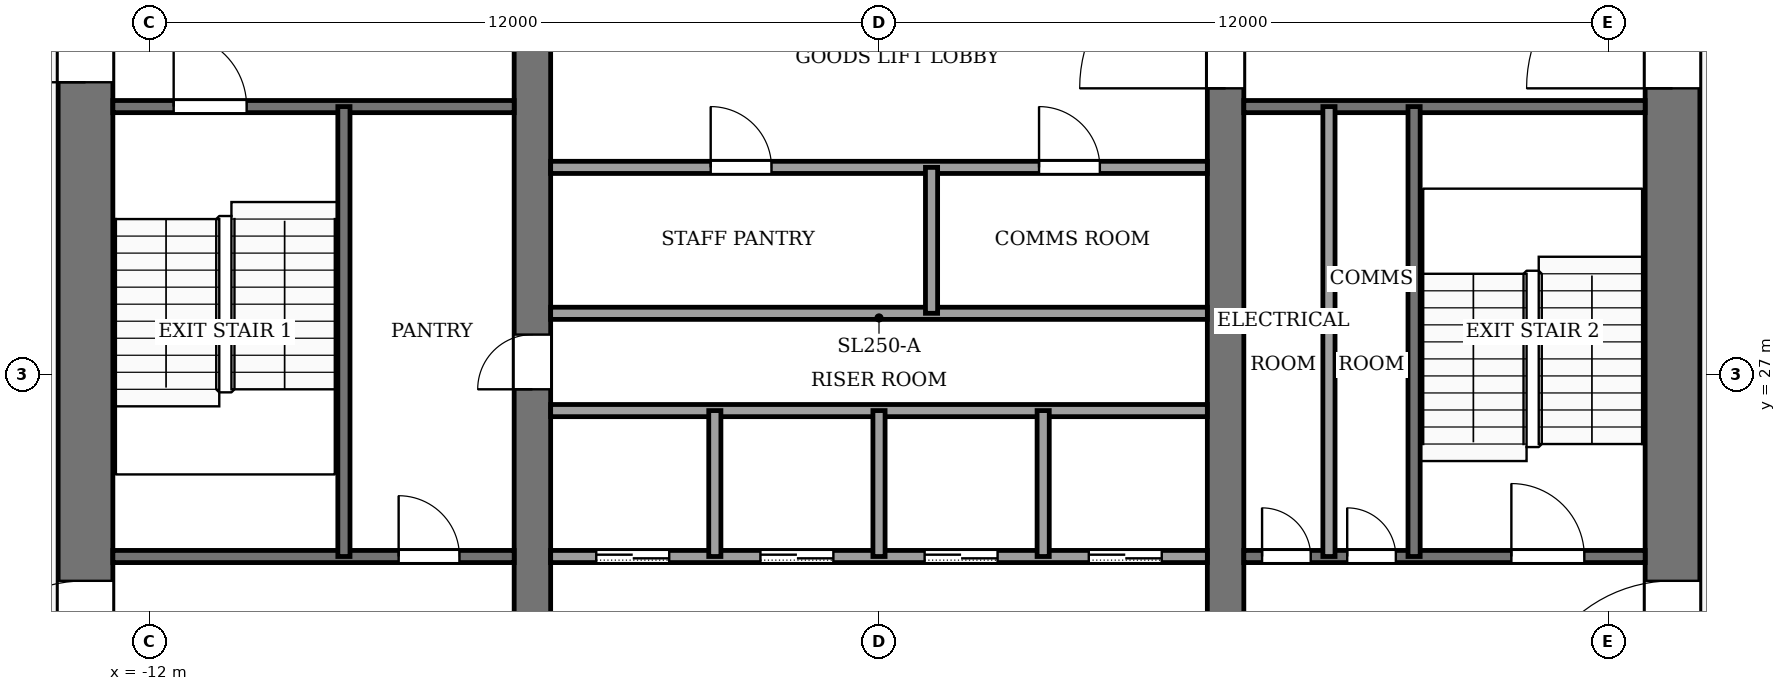
"""IFC4 building model, lengths in metres.
Left out: names, types, materials, properties, quantities, classifications, styles, units other than length and angle.
Written with IfcOpenShell. Run it as: python <this file> out.ifc"""

import sys

from ifc_helpers import new_model, si_unit, direction, frame, frame_2d, origin, place, context, subcontext, project, spatial, rectangle, extrude, element, fill, save


model = new_model("IFC4")
c1 = context("Model", 3, precision=1e-05, world=origin(), true_north=direction((0.0, 1.0)))
c2 = subcontext(c1, "Body", "Model", "MODEL_VIEW")
j1 = project(units=[si_unit("LENGTHUNIT", "METRE"), si_unit("PLANEANGLEUNIT", "RADIAN")], contexts=[c1])
p1 = place(None, origin())
s1 = spatial("IfcSite", under=j1, at=p1, CompositionType="ELEMENT")
p2 = place(p1, origin())
s2 = spatial("IfcBuilding", under=s1, at=p2, CompositionType="ELEMENT")
p3 = place(p2, frame((0.0, 0.0, 194.0)))
s3 = spatial("IfcBuildingStorey", under=s2, at=p3, CompositionType="ELEMENT", Elevation=194.0)
p4 = place(p3, frame((-13.05, 18.4, -0.13), z_axis=(0.0, 0.0, 1.0), x_axis=(0.0, 1.0, 0.0)))
e1 = element("IfcWall", 1, at=p4, inside=s3, PredefinedType="SHEAR", context=c2, shape_type="SweptSolid", body=[
    extrude(rectangle(XDim=19.2, YDim=0.9, at=frame_2d((9.6, 0.0))), origin(), (0.0, 0.0, 1.0), 4.0),
])
p5 = place(p4, frame((2.8, 0.0, 0.13)))
e2 = element("IfcOpeningElement", 2, at=p5, cuts=e1, PredefinedType="OPENING", context=c2, shape_type="SweptSolid", body=[
    extrude(rectangle(XDim=2.4, YDim=2.4, at=frame_2d((1.2, 1.2))), frame((0.0, 0.46, 0.0), z_axis=(0.0, -1.0, 0.0), x_axis=(1.0, 0.0, 0.0)), (0.0, 0.0, 1.0), 0.92),
])
p6 = place(p4, frame((13.4, 0.0, 0.13)))
e3 = element("IfcOpeningElement", 3, at=p6, cuts=e1, PredefinedType="OPENING", context=c2, shape_type="SweptSolid", body=[
    extrude(rectangle(XDim=1.4, YDim=2.2, at=frame_2d((0.7, 1.1))), frame((0.0, 0.46, 0.0), z_axis=(0.0, -1.0, 0.0), x_axis=(1.0, 0.0, 0.0)), (0.0, 0.0, 1.0), 0.92),
])
p7 = place(p3, frame((13.05, 18.4, -0.13), z_axis=(0.0, 0.0, 1.0), x_axis=(0.0, 1.0, 0.0)))
e4 = element("IfcWall", 4, at=p7, inside=s3, PredefinedType="SHEAR", context=c2, shape_type="SweptSolid", body=[
    extrude(rectangle(XDim=19.2, YDim=0.9, at=frame_2d((9.6, 0.0))), origin(), (0.0, 0.0, 1.0), 4.0),
])
p8 = place(p7, frame((2.8, 0.0, 0.13)))
e5 = element("IfcOpeningElement", 5, at=p8, cuts=e4, PredefinedType="OPENING", context=c2, shape_type="SweptSolid", body=[
    extrude(rectangle(XDim=2.4, YDim=2.4, at=frame_2d((1.2, 1.2))), frame((0.0, 0.46, 0.0), z_axis=(0.0, -1.0, 0.0), x_axis=(1.0, 0.0, 0.0)), (0.0, 0.0, 1.0), 0.92),
])
p9 = place(p7, frame((13.3, 0.0, 0.13)))
e6 = element("IfcOpeningElement", 6, at=p9, cuts=e4, PredefinedType="OPENING", context=c2, shape_type="SweptSolid", body=[
    extrude(rectangle(XDim=2.4, YDim=2.4, at=frame_2d((1.2, 1.2))), frame((0.0, 0.46, 0.0), z_axis=(0.0, -1.0, 0.0), x_axis=(1.0, 0.0, 0.0)), (0.0, 0.0, 1.0), 0.92),
])
p10 = place(p3, frame((-5.7, 18.4, -0.13), z_axis=(0.0, 0.0, 1.0), x_axis=(0.0, 1.0, 0.0)))
e7 = element("IfcWall", 7, at=p10, inside=s3, PredefinedType="SHEAR", context=c2, shape_type="SweptSolid", body=[
    extrude(rectangle(XDim=19.2, YDim=0.6, at=frame_2d((9.6, 0.0))), origin(), (0.0, 0.0, 1.0), 4.0),
])
p11 = place(p10, frame((8.35, 0.0, 0.13)))
e8 = element("IfcOpeningElement", 8, at=p11, cuts=e7, PredefinedType="OPENING", context=c2, shape_type="SweptSolid", body=[
    extrude(rectangle(XDim=0.9, YDim=2.1, at=frame_2d((0.45, 1.05))), frame((0.0, 0.31, 0.0), z_axis=(0.0, -1.0, 0.0), x_axis=(1.0, 0.0, 0.0)), (0.0, 0.0, 1.0), 0.62),
])
p12 = place(p3, frame((5.7, 18.4, -0.13), z_axis=(0.0, 0.0, 1.0), x_axis=(0.0, 1.0, 0.0)))
e9 = element("IfcWall", 9, at=p12, inside=s3, PredefinedType="SHEAR", context=c2, shape_type="SweptSolid", body=[
    extrude(rectangle(XDim=19.2, YDim=0.6, at=frame_2d((9.6, 0.0))), origin(), (0.0, 0.0, 1.0), 4.0),
])
p13 = place(p12, frame((13.3, 0.0, 0.13)))
e10 = element("IfcOpeningElement", 10, at=p13, cuts=e9, PredefinedType="OPENING", context=c2, shape_type="SweptSolid", body=[
    extrude(rectangle(XDim=2.4, YDim=2.4, at=frame_2d((1.2, 1.2))), frame((0.0, 0.31, 0.0), z_axis=(0.0, -1.0, 0.0), x_axis=(1.0, 0.0, 0.0)), (0.0, 0.0, 1.0), 0.62),
])
p14 = place(p3, frame((-12.6, 24.0, 0.0), z_axis=(0.0, 0.0, 1.0), x_axis=(1.0, 0.0, 0.0)))
e11 = element("IfcWall", 11, at=p14, inside=s3, PredefinedType="PARTITIONING", context=c2, shape_type="SweptSolid", body=[
    extrude(rectangle(XDim=6.6, YDim=0.2, at=frame_2d((3.3, 0.0))), origin(), (0.0, 0.0, 1.0), 3.87),
])
p15 = place(p14, frame((4.7, 0.0, 0.0)))
e12 = element("IfcOpeningElement", 12, at=p15, cuts=e11, PredefinedType="OPENING", context=c2, shape_type="SweptSolid", body=[
    extrude(rectangle(XDim=1.0, YDim=2.1, at=frame_2d((0.5, 1.05))), frame((0.0, 0.11, 0.0), z_axis=(0.0, -1.0, 0.0), x_axis=(1.0, 0.0, 0.0)), (0.0, 0.0, 1.0), 0.22),
])
p16 = place(p3, frame((-5.4, 24.0, 0.0), z_axis=(0.0, 0.0, 1.0), x_axis=(1.0, 0.0, 0.0)))
e13 = element("IfcWall", 13, at=p16, inside=s3, PredefinedType="PARTITIONING", context=c2, shape_type="SweptSolid", body=[
    extrude(rectangle(XDim=10.8, YDim=0.2, at=frame_2d((5.4, 0.0))), origin(), (0.0, 0.0, 1.0), 3.87),
])
p17 = place(p16, frame((0.75, 0.0, 0.0)))
e14 = element("IfcOpeningElement", 14, at=p17, cuts=e13, PredefinedType="OPENING", context=c2, shape_type="SweptSolid", body=[
    extrude(rectangle(XDim=1.2, YDim=2.2, at=frame_2d((0.6, 1.1))), frame((0.0, 0.11, 0.0), z_axis=(0.0, -1.0, 0.0), x_axis=(1.0, 0.0, 0.0)), (0.0, 0.0, 1.0), 0.22),
])
p18 = place(p16, frame((3.45, 0.0, 0.0)))
e15 = element("IfcOpeningElement", 15, at=p18, cuts=e13, PredefinedType="OPENING", context=c2, shape_type="SweptSolid", body=[
    extrude(rectangle(XDim=1.2, YDim=2.2, at=frame_2d((0.6, 1.1))), frame((0.0, 0.11, 0.0), z_axis=(0.0, -1.0, 0.0), x_axis=(1.0, 0.0, 0.0)), (0.0, 0.0, 1.0), 0.22),
])
p19 = place(p16, frame((6.15, 0.0, 0.0)))
e16 = element("IfcOpeningElement", 16, at=p19, cuts=e13, PredefinedType="OPENING", context=c2, shape_type="SweptSolid", body=[
    extrude(rectangle(XDim=1.2, YDim=2.2, at=frame_2d((0.6, 1.1))), frame((0.0, 0.11, 0.0), z_axis=(0.0, -1.0, 0.0), x_axis=(1.0, 0.0, 0.0)), (0.0, 0.0, 1.0), 0.22),
])
p20 = place(p16, frame((8.85, 0.0, 0.0)))
e17 = element("IfcOpeningElement", 17, at=p20, cuts=e13, PredefinedType="OPENING", context=c2, shape_type="SweptSolid", body=[
    extrude(rectangle(XDim=1.2, YDim=2.2, at=frame_2d((0.6, 1.1))), frame((0.0, 0.11, 0.0), z_axis=(0.0, -1.0, 0.0), x_axis=(1.0, 0.0, 0.0)), (0.0, 0.0, 1.0), 0.22),
])
p21 = place(p3, frame((6.0, 24.0, 0.0), z_axis=(0.0, 0.0, 1.0), x_axis=(1.0, 0.0, 0.0)))
e18 = element("IfcWall", 18, at=p21, inside=s3, PredefinedType="PARTITIONING", context=c2, shape_type="SweptSolid", body=[
    extrude(rectangle(XDim=6.6, YDim=0.2, at=frame_2d((3.3, 0.0))), origin(), (0.0, 0.0, 1.0), 3.87),
])
p22 = place(p21, frame((0.3, 0.0, 0.0)))
e19 = element("IfcOpeningElement", 19, at=p22, cuts=e18, PredefinedType="OPENING", context=c2, shape_type="SweptSolid", body=[
    extrude(rectangle(XDim=0.8, YDim=2.1, at=frame_2d((0.4, 1.05))), frame((0.0, 0.11, 0.0), z_axis=(0.0, -1.0, 0.0), x_axis=(1.0, 0.0, 0.0)), (0.0, 0.0, 1.0), 0.22),
])
p23 = place(p21, frame((1.7, 0.0, 0.0)))
e20 = element("IfcOpeningElement", 20, at=p23, cuts=e18, PredefinedType="OPENING", context=c2, shape_type="SweptSolid", body=[
    extrude(rectangle(XDim=0.8, YDim=2.1, at=frame_2d((0.4, 1.05))), frame((0.0, 0.11, 0.0), z_axis=(0.0, -1.0, 0.0), x_axis=(1.0, 0.0, 0.0)), (0.0, 0.0, 1.0), 0.22),
])
p24 = place(p21, frame((4.4, 0.0, 0.0)))
e21 = element("IfcOpeningElement", 21, at=p24, cuts=e18, PredefinedType="OPENING", context=c2, shape_type="SweptSolid", body=[
    extrude(rectangle(XDim=1.2, YDim=2.2, at=frame_2d((0.6, 1.1))), frame((0.0, 0.11, 0.0), z_axis=(0.0, -1.0, 0.0), x_axis=(1.0, 0.0, 0.0)), (0.0, 0.0, 1.0), 0.22),
])
for number, where, z_axis, x_axis in (
    (22, (-5.4, 26.4, 0.0), (0.0, 0.0, 1.0), (1.0, 0.0, 0.0)),
    (23, (-5.4, 28.0, 0.0), (0.0, 0.0, 1.0), (1.0, 0.0, 0.0)),
):
    element("IfcWall", number, at=place(p3, frame(where, z_axis=z_axis, x_axis=x_axis)), inside=s3, PredefinedType="PARTITIONING", context=c2, shape_type="SweptSolid", body=[
        extrude(rectangle(XDim=10.8, YDim=0.2, at=frame_2d((5.4, 0.0))), origin(), (0.0, 0.0, 1.0), 3.87),
    ])
p25 = place(p3, frame((-5.4, 30.4, 0.0), z_axis=(0.0, 0.0, 1.0), x_axis=(1.0, 0.0, 0.0)))
e24 = element("IfcWall", 24, at=p25, inside=s3, PredefinedType="PARTITIONING", context=c2, shape_type="SweptSolid", body=[
    extrude(rectangle(XDim=10.8, YDim=0.2, at=frame_2d((5.4, 0.0))), origin(), (0.0, 0.0, 1.0), 3.87),
])
p26 = place(p25, frame((2.632, 0.0, 0.0)))
e25 = element("IfcOpeningElement", 25, at=p26, cuts=e24, PredefinedType="OPENING", context=c2, shape_type="SweptSolid", body=[
    extrude(rectangle(XDim=1.0, YDim=2.1, at=frame_2d((0.5, 1.05))), frame((0.0, 0.11, 0.0), z_axis=(0.0, -1.0, 0.0), x_axis=(1.0, 0.0, 0.0)), (0.0, 0.0, 1.0), 0.22),
])
p27 = place(p25, frame((8.032, 0.0, 0.0)))
e26 = element("IfcOpeningElement", 26, at=p27, cuts=e24, PredefinedType="OPENING", context=c2, shape_type="SweptSolid", body=[
    extrude(rectangle(XDim=1.0, YDim=2.1, at=frame_2d((0.5, 1.05))), frame((0.0, 0.11, 0.0), z_axis=(0.0, -1.0, 0.0), x_axis=(1.0, 0.0, 0.0)), (0.0, 0.0, 1.0), 0.22),
])
p28 = place(p3, frame((-12.6, 31.4, 0.0), z_axis=(0.0, 0.0, 1.0), x_axis=(1.0, 0.0, 0.0)))
e27 = element("IfcWall", 27, at=p28, inside=s3, PredefinedType="PARTITIONING", context=c2, shape_type="SweptSolid", body=[
    extrude(rectangle(XDim=6.6, YDim=0.2, at=frame_2d((3.3, 0.0))), origin(), (0.0, 0.0, 1.0), 3.87),
])
p29 = place(p28, frame((1.0, 0.0, 0.0)))
e28 = element("IfcOpeningElement", 28, at=p29, cuts=e27, PredefinedType="OPENING", context=c2, shape_type="SweptSolid", body=[
    extrude(rectangle(XDim=1.2, YDim=2.2, at=frame_2d((0.6, 1.1))), frame((0.0, 0.11, 0.0), z_axis=(0.0, -1.0, 0.0), x_axis=(1.0, 0.0, 0.0)), (0.0, 0.0, 1.0), 0.22),
])
p30 = place(p3, frame((6.0, 31.4, 0.0), z_axis=(0.0, 0.0, 1.0), x_axis=(1.0, 0.0, 0.0)))
e29 = element("IfcWall", 29, at=p30, inside=s3, PredefinedType="PARTITIONING", context=c2, shape_type="SweptSolid", body=[
    extrude(rectangle(XDim=6.6, YDim=0.2, at=frame_2d((3.3, 0.0))), origin(), (0.0, 0.0, 1.0), 3.87),
])
p31 = place(p3, frame((-8.8, 24.0, 0.0), z_axis=(0.0, 0.0, 1.0), x_axis=(0.0, 1.0, 0.0)))
e30 = element("IfcWall", 30, at=p31, inside=s3, PredefinedType="PARTITIONING", context=c2, shape_type="SweptSolid", body=[
    extrude(rectangle(XDim=7.4, YDim=0.2, at=frame_2d((3.7, 0.0))), origin(), (0.0, 0.0, 1.0), 3.87),
])
for number, where, z_axis, x_axis in (
    (31, (-2.7, 24.0, 0.0), (0.0, 0.0, 1.0), (0.0, 1.0, 0.0)),
    (32, (0.0, 24.0, 0.0), (0.0, 0.0, 1.0), (0.0, 1.0, 0.0)),
    (33, (0.864, 28.0, 0.0), (0.0, 0.0, 1.0), (0.0, 1.0, 0.0)),
    (34, (2.7, 24.0, 0.0), (0.0, 0.0, 1.0), (0.0, 1.0, 0.0)),
):
    element("IfcWall", number, at=place(p3, frame(where, z_axis=z_axis, x_axis=x_axis)), inside=s3, PredefinedType="PARTITIONING", context=c2, shape_type="SweptSolid", body=[
        extrude(rectangle(XDim=2.4, YDim=0.2, at=frame_2d((1.2, 0.0))), origin(), (0.0, 0.0, 1.0), 3.87),
    ])
for number, where, z_axis, x_axis in (
    (35, (7.4, 24.0, 0.0), (0.0, 0.0, 1.0), (0.0, 1.0, 0.0)),
    (36, (8.8, 24.0, 0.0), (0.0, 0.0, 1.0), (0.0, 1.0, 0.0)),
):
    element("IfcWall", number, at=place(p3, frame(where, z_axis=z_axis, x_axis=x_axis)), inside=s3, PredefinedType="PARTITIONING", context=c2, shape_type="SweptSolid", body=[
        extrude(rectangle(XDim=7.4, YDim=0.2, at=frame_2d((3.7, 0.0))), origin(), (0.0, 0.0, 1.0), 3.87),
    ])
p32 = place(p17, origin())
e37 = element("IfcDoor", 37, at=p32, inside=s3, OperationType="SLIDING_TO_LEFT", PredefinedType="DOOR", context=c2, shape_type="SweptSolid", body=[
    extrude(rectangle(XDim=1.2, YDim=2.2, at=frame_2d((0.6, 1.1))), frame((0.0, 0.025, 0.0), z_axis=(0.0, -1.0, 0.0), x_axis=(1.0, 0.0, 0.0)), (0.0, 0.0, 1.0), 0.05),
])
fill(e14, e37)
p33 = place(p18, origin())
e38 = element("IfcDoor", 38, at=p33, inside=s3, OperationType="SLIDING_TO_LEFT", PredefinedType="DOOR", context=c2, shape_type="SweptSolid", body=[
    extrude(rectangle(XDim=1.2, YDim=2.2, at=frame_2d((0.6, 1.1))), frame((0.0, 0.025, 0.0), z_axis=(0.0, -1.0, 0.0), x_axis=(1.0, 0.0, 0.0)), (0.0, 0.0, 1.0), 0.05),
])
fill(e15, e38)
p34 = place(p19, origin())
e39 = element("IfcDoor", 39, at=p34, inside=s3, OperationType="SLIDING_TO_LEFT", PredefinedType="DOOR", context=c2, shape_type="SweptSolid", body=[
    extrude(rectangle(XDim=1.2, YDim=2.2, at=frame_2d((0.6, 1.1))), frame((0.0, 0.025, 0.0), z_axis=(0.0, -1.0, 0.0), x_axis=(1.0, 0.0, 0.0)), (0.0, 0.0, 1.0), 0.05),
])
fill(e16, e39)
p35 = place(p20, origin())
e40 = element("IfcDoor", 40, at=p35, inside=s3, OperationType="SLIDING_TO_LEFT", PredefinedType="DOOR", context=c2, shape_type="SweptSolid", body=[
    extrude(rectangle(XDim=1.2, YDim=2.2, at=frame_2d((0.6, 1.1))), frame((0.0, 0.025, 0.0), z_axis=(0.0, -1.0, 0.0), x_axis=(1.0, 0.0, 0.0)), (0.0, 0.0, 1.0), 0.05),
])
fill(e17, e40)
p36 = place(p26, origin())
e41 = element("IfcDoor", 41, at=p36, inside=s3, OperationType="SINGLE_SWING_LEFT", PredefinedType="DOOR", context=c2, shape_type="SweptSolid", body=[
    extrude(rectangle(XDim=1.0, YDim=2.1, at=frame_2d((0.5, 1.05))), frame((0.0, 0.025, 0.0), z_axis=(0.0, -1.0, 0.0), x_axis=(1.0, 0.0, 0.0)), (0.0, 0.0, 1.0), 0.05),
])
fill(e25, e41)
p37 = place(p27, origin())
e42 = element("IfcDoor", 42, at=p37, inside=s3, OperationType="SINGLE_SWING_RIGHT", PredefinedType="DOOR", context=c2, shape_type="SweptSolid", body=[
    extrude(rectangle(XDim=1.0, YDim=2.1, at=frame_2d((0.5, 1.05))), frame((0.0, 0.025, 0.0), z_axis=(0.0, -1.0, 0.0), x_axis=(1.0, 0.0, 0.0)), (0.0, 0.0, 1.0), 0.05),
])
fill(e26, e42)
p38 = place(p15, origin())
e43 = element("IfcDoor", 43, at=p38, inside=s3, OperationType="SINGLE_SWING_LEFT", PredefinedType="DOOR", context=c2, shape_type="SweptSolid", body=[
    extrude(rectangle(XDim=1.0, YDim=2.1, at=frame_2d((0.5, 1.05))), frame((0.0, 0.025, 0.0), z_axis=(0.0, -1.0, 0.0), x_axis=(1.0, 0.0, 0.0)), (0.0, 0.0, 1.0), 0.05),
])
fill(e12, e43)
p39 = place(p22, origin())
e44 = element("IfcDoor", 44, at=p39, inside=s3, OperationType="SINGLE_SWING_LEFT", PredefinedType="DOOR", context=c2, shape_type="SweptSolid", body=[
    extrude(rectangle(XDim=0.8, YDim=2.1, at=frame_2d((0.4, 1.05))), frame((0.0, 0.025, 0.0), z_axis=(0.0, -1.0, 0.0), x_axis=(1.0, 0.0, 0.0)), (0.0, 0.0, 1.0), 0.05),
])
fill(e19, e44)
p40 = place(p23, origin())
e45 = element("IfcDoor", 45, at=p40, inside=s3, OperationType="SINGLE_SWING_RIGHT", PredefinedType="DOOR", context=c2, shape_type="SweptSolid", body=[
    extrude(rectangle(XDim=0.8, YDim=2.1, at=frame_2d((0.4, 1.05))), frame((0.0, 0.025, 0.0), z_axis=(0.0, -1.0, 0.0), x_axis=(1.0, 0.0, 0.0)), (0.0, 0.0, 1.0), 0.05),
])
fill(e20, e45)
p41 = place(p11, origin())
e46 = element("IfcDoor", 46, at=p41, inside=s3, OperationType="SINGLE_SWING_RIGHT", PredefinedType="DOOR", context=c2, shape_type="SweptSolid", body=[
    extrude(rectangle(XDim=0.9, YDim=2.1, at=frame_2d((0.45, 1.05))), frame((0.0, 0.025, 0.0), z_axis=(0.0, -1.0, 0.0), x_axis=(1.0, 0.0, 0.0)), (0.0, 0.0, 1.0), 0.05),
])
fill(e8, e46)
p42 = place(p29, origin())
e47 = element("IfcDoor", 47, at=p42, inside=s3, OperationType="SINGLE_SWING_RIGHT", PredefinedType="DOOR", context=c2, shape_type="SweptSolid", body=[
    extrude(rectangle(XDim=1.2, YDim=2.2, at=frame_2d((0.6, 1.1))), frame((0.0, 0.025, 0.0), z_axis=(0.0, -1.0, 0.0), x_axis=(1.0, 0.0, 0.0)), (0.0, 0.0, 1.0), 0.05),
])
fill(e28, e47)
p43 = place(p24, origin())
e48 = element("IfcDoor", 48, at=p43, inside=s3, OperationType="SINGLE_SWING_LEFT", PredefinedType="DOOR", context=c2, shape_type="SweptSolid", body=[
    extrude(rectangle(XDim=1.2, YDim=2.2, at=frame_2d((0.6, 1.1))), frame((0.0, 0.025, 0.0), z_axis=(0.0, -1.0, 0.0), x_axis=(1.0, 0.0, 0.0)), (0.0, 0.0, 1.0), 0.05),
])
fill(e21, e48)
p44 = place(p13, origin())
e49 = element("IfcDoor", 49, at=p44, inside=s3, OperationType="DOUBLE_DOOR_SINGLE_SWING", PredefinedType="DOOR", context=c2, shape_type="SweptSolid", body=[
    extrude(rectangle(XDim=2.4, YDim=2.4, at=frame_2d((1.2, 1.2))), frame((0.0, 0.025, 0.0), z_axis=(0.0, -1.0, 0.0), x_axis=(1.0, 0.0, 0.0)), (0.0, 0.0, 1.0), 0.05),
])
fill(e10, e49)
p45 = place(p5, origin())
e50 = element("IfcDoor", 50, at=p45, inside=s3, OperationType="DOUBLE_DOOR_SINGLE_SWING", PredefinedType="DOOR", context=c2, shape_type="SweptSolid", body=[
    extrude(rectangle(XDim=2.4, YDim=2.4, at=frame_2d((1.2, 1.2))), frame((0.0, 0.025, 0.0), z_axis=(0.0, -1.0, 0.0), x_axis=(1.0, 0.0, 0.0)), (0.0, 0.0, 1.0), 0.05),
])
fill(e2, e50)
p46 = place(p8, origin())
e51 = element("IfcDoor", 51, at=p46, inside=s3, OperationType="DOUBLE_DOOR_SINGLE_SWING", PredefinedType="DOOR", context=c2, shape_type="SweptSolid", body=[
    extrude(rectangle(XDim=2.4, YDim=2.4, at=frame_2d((1.2, 1.2))), frame((0.0, 0.025, 0.0), z_axis=(0.0, -1.0, 0.0), x_axis=(1.0, 0.0, 0.0)), (0.0, 0.0, 1.0), 0.05),
])
fill(e5, e51)
p47 = place(p9, origin())
e52 = element("IfcDoor", 52, at=p47, inside=s3, OperationType="DOUBLE_DOOR_SINGLE_SWING", PredefinedType="DOOR", context=c2, shape_type="SweptSolid", body=[
    extrude(rectangle(XDim=2.4, YDim=2.4, at=frame_2d((1.2, 1.2))), frame((0.0, 0.025, 0.0), z_axis=(0.0, -1.0, 0.0), x_axis=(1.0, 0.0, 0.0)), (0.0, 0.0, 1.0), 0.05),
])
fill(e6, e52)
p48 = place(p6, origin())
e53 = element("IfcDoor", 53, at=p48, inside=s3, OperationType="SINGLE_SWING_RIGHT", PredefinedType="DOOR", context=c2, shape_type="SweptSolid", body=[
    extrude(rectangle(XDim=1.4, YDim=2.2, at=frame_2d((0.7, 1.1))), frame((0.0, 0.025, 0.0), z_axis=(0.0, -1.0, 0.0), x_axis=(1.0, 0.0, 0.0)), (0.0, 0.0, 1.0), 0.05),
])
fill(e3, e53)
save(model, sys.argv[1])
